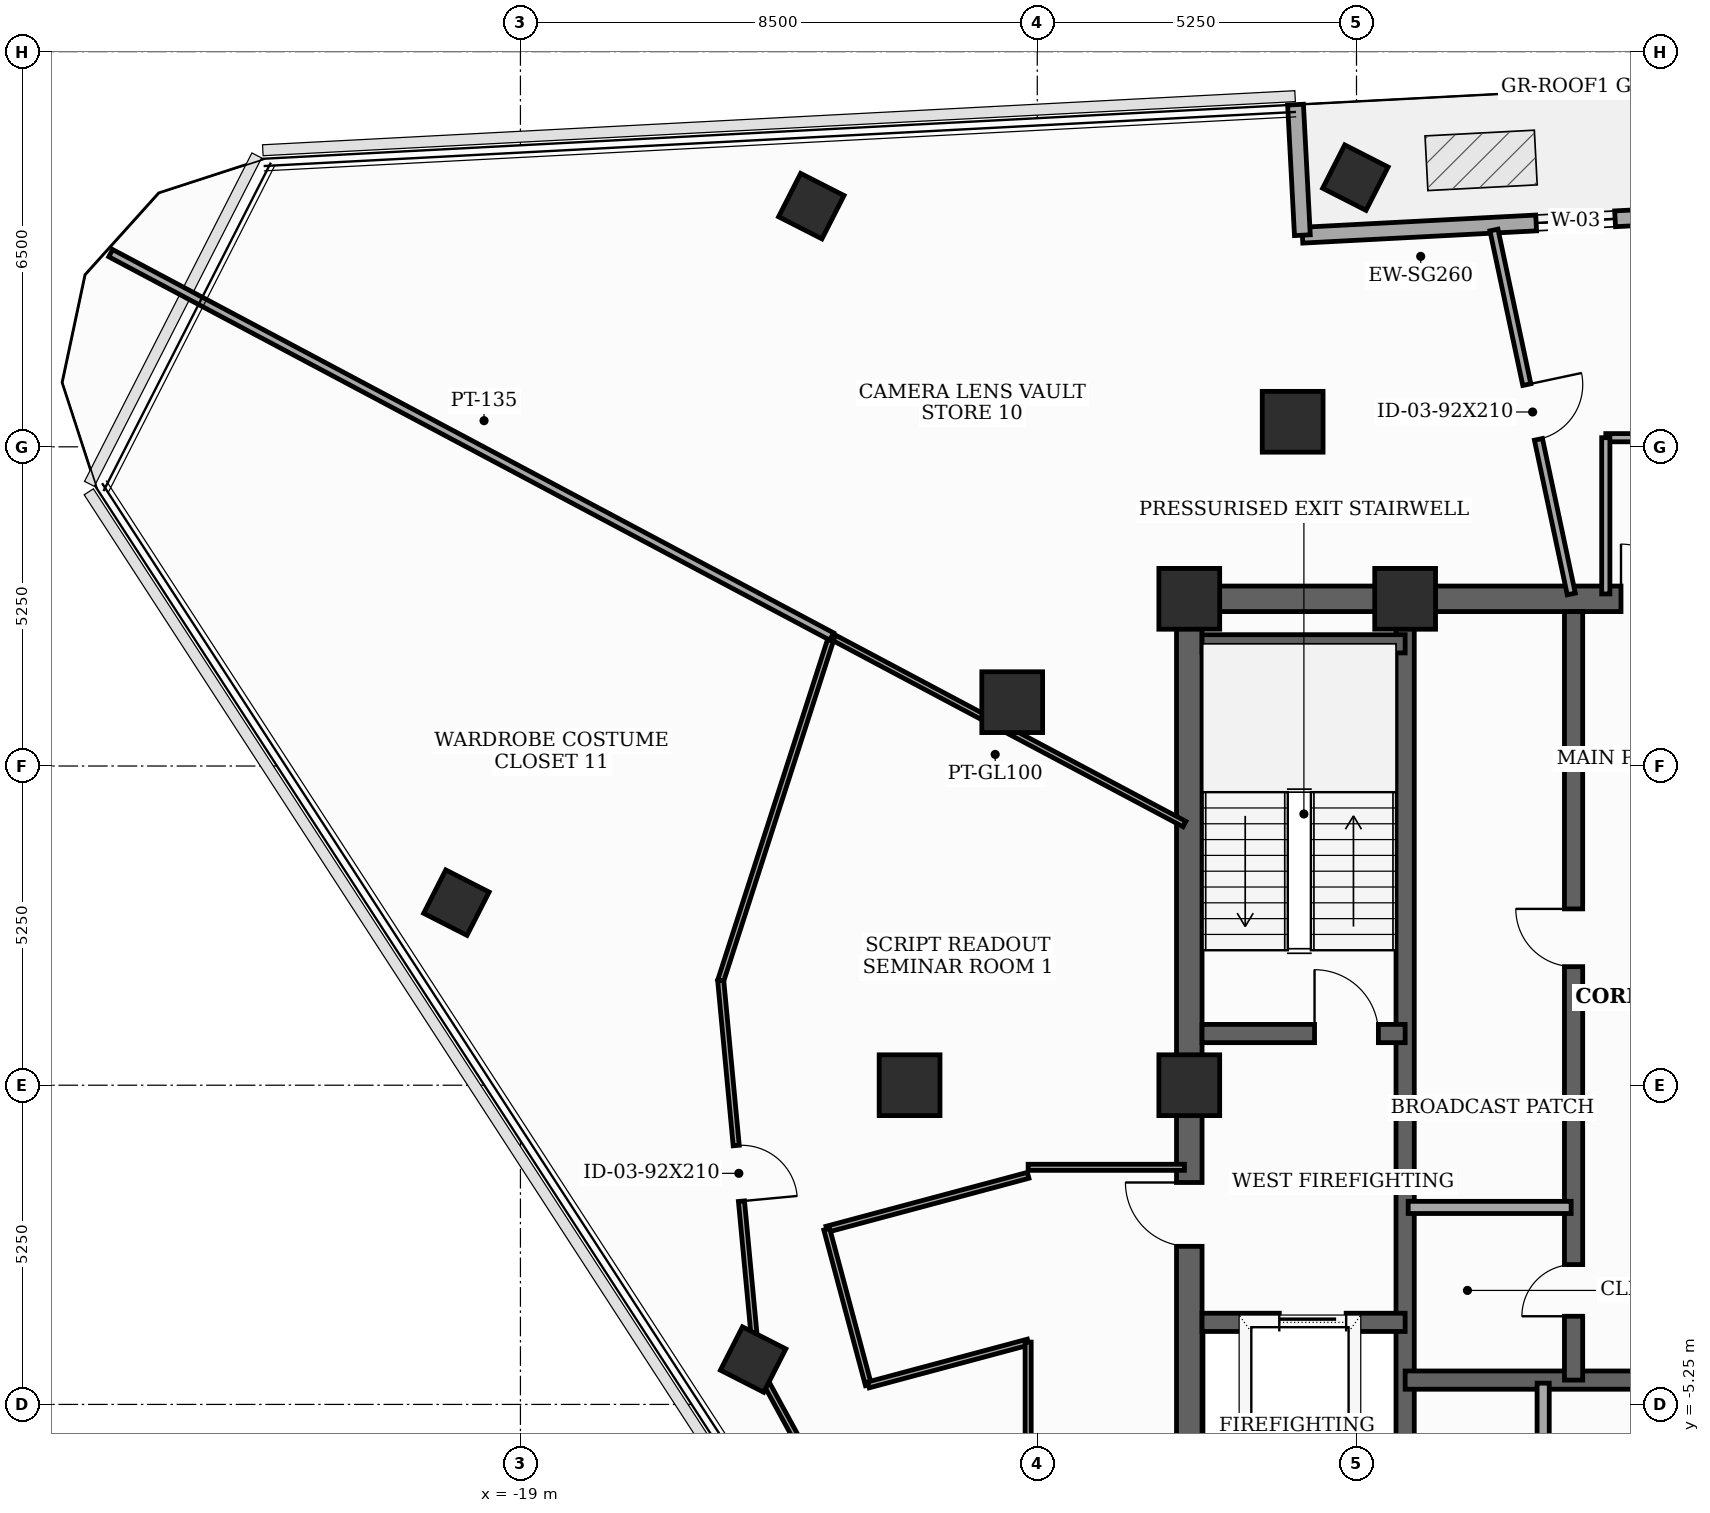
"""IFC4 building model, lengths in metres.
Left out: names, types, materials, properties, quantities, classifications, styles, units other than length and angle.
Written with IfcOpenShell. Run it as: python <this file> out.ifc"""

import sys

from ifc_helpers import new_model, si_unit, direction, frame, frame_2d, origin, origin_2d, place, context, subcontext, project, spatial, rectangle, extrude, element, fill, save


model = new_model("IFC4")
c1 = context("Model", 3, precision=1e-05, world=origin(), true_north=direction((0.0, 1.0)))
c2 = subcontext(c1, "Body", "Model", "MODEL_VIEW")
j1 = project(units=[si_unit("LENGTHUNIT", "METRE"), si_unit("PLANEANGLEUNIT", "RADIAN")], contexts=[c1])
p1 = place(None, origin())
s1 = spatial("IfcSite", under=j1, at=p1, CompositionType="ELEMENT")
p2 = place(p1, origin())
s2 = spatial("IfcBuilding", under=s1, at=p2, CompositionType="ELEMENT")
p3 = place(p2, frame((0.0, 0.0, 270.7)))
s3 = spatial("IfcBuildingStorey", under=s2, at=p3, CompositionType="ELEMENT", Elevation=270.7)
for number, where, z_axis, x_axis in (
    (1, (-4.45, 8.0, 0.0), (0.0, 0.0, 1.0), (1.0, 0.0, 0.0)),
    (2, (-8.0, 8.0, 0.0), (0.0, 0.0, 1.0), (1.0, 0.0, 0.0)),
    (3, (-8.0, 0.0, 0.0), (0.0, 0.0, 1.0), (1.0, 0.0, 0.0)),
    (4, (-6.3, 10.912, 0.0), (0.0, 0.0, 1.0), (1.0, 0.0, 0.0)),
    (5, (-10.912, 6.3, 0.0), (0.0, 0.0, 1.0), (1.0, 0.0, 0.0)),
    (6, (-12.6, 0.0, 0.0), (0.0, 0.0, 1.0), (1.0, 0.0, 0.0)),
):
    element("IfcColumn", number, at=place(p3, frame(where, z_axis=z_axis, x_axis=x_axis)), inside=s3, PredefinedType="COLUMN", context=c2, shape_type="SweptSolid", body=[
        extrude(rectangle(XDim=1.0, YDim=1.0, at=origin_2d()), origin(), (0.0, 0.0, 1.0), 3.7),
    ])
for number, where, z_axis, x_axis in (
    (7, (-5.269, 14.927, 0.0), (0.0, 0.0, 1.0), (0.454, 0.891, 0.0)),
    (8, (-14.216, 14.458, 0.0), (0.0, 0.0, 1.0), (0.454, 0.891, 0.0)),
    (9, (-20.053, 3.003, 0.0), (0.0, 0.0, 1.0), (0.454, 0.891, 0.0)),
    (10, (-15.173, -4.512, 0.0), (0.0, 0.0, 1.0), (0.454, 0.891, 0.0)),
):
    element("IfcColumn", number, at=place(p3, frame(where, z_axis=z_axis, x_axis=x_axis)), inside=s3, PredefinedType="COLUMN", context=c2, shape_type="SweptSolid", body=[
        extrude(rectangle(XDim=0.8, YDim=0.8, at=origin_2d()), origin(), (0.0, 0.0, 1.0), 3.7),
    ])
p4 = place(p3, frame((4.645, 14.546, 0.0), z_axis=(0.0, 0.0, 1.0), x_axis=(-0.99862973094, -0.052332212675, 0.0)))
e11 = element("IfcWall", 11, at=p4, inside=s3, PredefinedType="SOLIDWALL", context=c2, shape_type="SweptSolid", body=[
    extrude(rectangle(XDim=10.8, YDim=0.26, at=frame_2d((5.4, 0.0))), origin(), (0.0, 0.0, 1.0), 3.5),
])
p5 = place(p4, frame((1.75, 0.0, 0.0)))
e12 = element("IfcOpeningElement", 12, at=p5, cuts=e11, PredefinedType="OPENING", context=c2, shape_type="SweptSolid", body=[
    extrude(rectangle(XDim=1.6, YDim=2.08, at=frame_2d((0.8, 1.04))), frame((0.0, 0.14, 0.0), z_axis=(0.0, -1.0, 0.0), x_axis=(1.0, 0.0, 0.0)), (0.0, 0.0, 1.0), 0.28),
])
p6 = place(p4, frame((5.65, 0.0, 0.85)))
e13 = element("IfcOpeningElement", 13, at=p6, cuts=e11, PredefinedType="OPENING", context=c2, shape_type="SweptSolid", body=[
    extrude(rectangle(XDim=1.3, YDim=1.25, at=frame_2d((0.65, 0.625))), frame((0.0, 0.14, 0.0), z_axis=(0.0, -1.0, 0.0), x_axis=(1.0, 0.0, 0.0)), (0.0, 0.0, 1.0), 0.28),
])
p7 = place(p3, frame((-6.14, 13.98, 0.0), z_axis=(0.0, 0.0, 1.0), x_axis=(-0.052350224103, 0.998628786905, 0.0)))
e14 = element("IfcWall", 14, at=p7, inside=s3, PredefinedType="SOLIDWALL", context=c2, shape_type="SweptSolid", body=[
    extrude(rectangle(XDim=2.15, YDim=0.26, at=frame_2d((1.075, 0.0))), origin(), (0.0, 0.0, 1.0), 3.5),
])
p8 = place(p3, frame((-8.0, -8.0, 0.0), z_axis=(0.0, 0.0, 1.0), x_axis=(0.0, 1.0, 0.0)))
e15 = element("IfcWall", 15, at=p8, inside=s3, PredefinedType="SHEAR", context=c2, shape_type="SweptSolid", body=[
    extrude(rectangle(XDim=16.0, YDim=0.42, at=frame_2d((8.0, 0.0))), origin(), (0.0, 0.0, 1.0), 3.5),
])
p9 = place(p8, frame((0.681, 0.0, 0.0)))
e16 = element("IfcOpeningElement", 16, at=p9, cuts=e15, PredefinedType="OPENING", context=c2, shape_type="SweptSolid", body=[
    extrude(rectangle(XDim=0.85, YDim=2.02, at=frame_2d((0.425, 1.01))), frame((0.0, 0.22, 0.0), z_axis=(0.0, -1.0, 0.0), x_axis=(1.0, 0.0, 0.0)), (0.0, 0.0, 1.0), 0.44),
])
p10 = place(p8, frame((5.35, 0.0, 0.0)))
e17 = element("IfcOpeningElement", 17, at=p10, cuts=e15, PredefinedType="OPENING", context=c2, shape_type="SweptSolid", body=[
    extrude(rectangle(XDim=1.05, YDim=2.15, at=frame_2d((0.525, 1.075))), frame((0.0, 0.22, 0.0), z_axis=(0.0, -1.0, 0.0), x_axis=(1.0, 0.0, 0.0)), (0.0, 0.0, 1.0), 0.44),
])
p11 = place(p3, frame((-8.0, 8.0, 0.0), z_axis=(0.0, 0.0, 1.0), x_axis=(1.0, 0.0, 0.0)))
e18 = element("IfcWall", 18, at=p11, inside=s3, PredefinedType="SHEAR", context=c2, shape_type="SweptSolid", body=[
    extrude(rectangle(XDim=16.0, YDim=0.42, at=frame_2d((8.0, 0.0))), origin(), (0.0, 0.0, 1.0), 3.5),
])
p12 = place(p11, frame((7.1, 0.0, 0.0)))
e19 = element("IfcOpeningElement", 19, at=p12, cuts=e18, PredefinedType="OPENING", context=c2, shape_type="SweptSolid", body=[
    extrude(rectangle(XDim=1.8, YDim=2.15, at=frame_2d((0.9, 1.075))), frame((0.0, 0.22, 0.0), z_axis=(0.0, -1.0, 0.0), x_axis=(1.0, 0.0, 0.0)), (0.0, 0.0, 1.0), 0.44),
])
p13 = place(p3, frame((-4.45, -7.79, 0.0), z_axis=(0.0, 0.0, 1.0), x_axis=(0.0, 1.0, 0.0)))
e20 = element("IfcWall", 20, at=p13, inside=s3, PredefinedType="SHEAR", context=c2, shape_type="SweptSolid", body=[
    extrude(rectangle(XDim=15.58, YDim=0.3, at=frame_2d((7.79, 0.0))), origin(), (0.0, 0.0, 1.0), 3.5),
])
p14 = place(p3, frame((-7.79, 0.85, 0.0), z_axis=(0.0, 0.0, 1.0), x_axis=(1.0, 0.0, 0.0)))
e21 = element("IfcWall", 21, at=p14, inside=s3, PredefinedType="SHEAR", context=c2, shape_type="SweptSolid", body=[
    extrude(rectangle(XDim=3.34, YDim=0.3, at=frame_2d((1.67, 0.0))), origin(), (0.0, 0.0, 1.0), 3.5),
])
p15 = place(p14, frame((1.85, 0.0, 0.0)))
e22 = element("IfcOpeningElement", 22, at=p15, cuts=e21, PredefinedType="OPENING", context=c2, shape_type="SweptSolid", body=[
    extrude(rectangle(XDim=1.05, YDim=2.15, at=frame_2d((0.525, 1.075))), frame((0.0, 0.16, 0.0), z_axis=(0.0, -1.0, 0.0), x_axis=(1.0, 0.0, 0.0)), (0.0, 0.0, 1.0), 0.32),
])
p16 = place(p3, frame((-7.79, 7.26, 0.0), z_axis=(0.0, 0.0, 1.0), x_axis=(1.0, 0.0, 0.0)))
e23 = element("IfcWall", 23, at=p16, inside=s3, PredefinedType="SHEAR", context=c2, shape_type="SweptSolid", body=[
    extrude(rectangle(XDim=3.34, YDim=0.3, at=frame_2d((1.67, 0.0))), origin(), (0.0, 0.0, 1.0), 3.5),
])
p17 = place(p3, frame((-7.79, -3.9, 0.0), z_axis=(0.0, 0.0, 1.0), x_axis=(1.0, 0.0, 0.0)))
e24 = element("IfcWall", 24, at=p17, inside=s3, PredefinedType="SHEAR", context=c2, shape_type="SweptSolid", body=[
    extrude(rectangle(XDim=3.34, YDim=0.3, at=frame_2d((1.67, 0.0))), origin(), (0.0, 0.0, 1.0), 3.5),
])
p18 = place(p17, frame((1.27, 0.0, 0.0)))
e25 = element("IfcOpeningElement", 25, at=p18, cuts=e24, PredefinedType="OPENING", context=c2, shape_type="SweptSolid", body=[
    extrude(rectangle(XDim=1.1, YDim=2.1, at=frame_2d((0.55, 1.05))), frame((0.0, 0.16, 0.0), z_axis=(0.0, -1.0, 0.0), x_axis=(1.0, 0.0, 0.0)), (0.0, 0.0, 1.0), 0.32),
])
p19 = place(p3, frame((-4.45, -4.85, 0.0), z_axis=(0.0, 0.0, 1.0), x_axis=(1.0, 0.0, 0.0)))
e26 = element("IfcWall", 26, at=p19, inside=s3, PredefinedType="SHEAR", context=c2, shape_type="SweptSolid", body=[
    extrude(rectangle(XDim=8.9, YDim=0.3, at=frame_2d((4.45, 0.0))), origin(), (0.0, 0.0, 1.0), 3.5),
])
p20 = place(p3, frame((-1.68, -4.85, 0.0), z_axis=(0.0, 0.0, 1.0), x_axis=(0.0, 1.0, 0.0)))
e27 = element("IfcWall", 27, at=p20, inside=s3, PredefinedType="SHEAR", context=c2, shape_type="SweptSolid", body=[
    extrude(rectangle(XDim=12.64, YDim=0.3, at=frame_2d((6.32, 0.0))), origin(), (0.0, 0.0, 1.0), 3.5),
])
p21 = place(p20, frame((1.05, 0.0, 0.0)))
e28 = element("IfcOpeningElement", 28, at=p21, cuts=e27, PredefinedType="OPENING", context=c2, shape_type="SweptSolid", body=[
    extrude(rectangle(XDim=0.85, YDim=2.02, at=frame_2d((0.425, 1.01))), frame((0.0, 0.16, 0.0), z_axis=(0.0, -1.0, 0.0), x_axis=(1.0, 0.0, 0.0)), (0.0, 0.0, 1.0), 0.32),
])
p22 = place(p20, frame((6.8, 0.0, 0.0)))
e29 = element("IfcOpeningElement", 29, at=p22, cuts=e27, PredefinedType="OPENING", context=c2, shape_type="SweptSolid", body=[
    extrude(rectangle(XDim=0.95, YDim=2.1, at=frame_2d((0.475, 1.05))), frame((0.0, 0.16, 0.0), z_axis=(0.0, -1.0, 0.0), x_axis=(1.0, 0.0, 0.0)), (0.0, 0.0, 1.0), 0.32),
])
p23 = place(p3, frame((-2.18, -7.85, 0.0), z_axis=(0.0, 0.0, 1.0), x_axis=(0.0, 1.0, 0.0)))
e30 = element("IfcWall", 30, at=p23, inside=s3, PredefinedType="SOLIDWALL", context=c2, shape_type="SweptSolid", body=[
    extrude(rectangle(XDim=2.95, YDim=0.2, at=frame_2d((1.475, 0.0))), origin(), (0.0, 0.0, 1.0), 2.885),
])
p24 = place(p3, frame((-4.4, -2.01, 0.0), z_axis=(0.0, 0.0, 1.0), x_axis=(1.0, 0.0, 0.0)))
e31 = element("IfcWall", 31, at=p24, inside=s3, PredefinedType="SOLIDWALL", context=c2, shape_type="SweptSolid", body=[
    extrude(rectangle(XDim=2.68, YDim=0.2, at=frame_2d((1.34, 0.0))), origin(), (0.0, 0.0, 1.0), 3.5),
])
p25 = place(p3, frame((-8.08, -1.35, 0.0), z_axis=(0.0, 0.0, 1.0), x_axis=(-1.0, 0.0, 0.0)))
e32 = element("IfcWall", 32, at=p25, inside=s3, PredefinedType="MOVABLE", context=c2, shape_type="SweptSolid", body=[
    extrude(rectangle(XDim=2.57, YDim=0.1, at=frame_2d((1.285, 0.0))), origin(), (0.0, 0.0, 1.0), 2.885),
])
p26 = place(p3, frame((-10.65, -1.482, 0.0), z_axis=(0.0, 0.0, 1.0), x_axis=(-0.965961397105, -0.2586862565, 0.0)))
e33 = element("IfcWall", 33, at=p26, inside=s3, PredefinedType="MOVABLE", context=c2, shape_type="SweptSolid", body=[
    extrude(rectangle(XDim=3.429, YDim=0.1, at=frame_2d((1.714, 0.0))), origin(), (0.0, 0.0, 1.0), 2.885),
])
p27 = place(p3, frame((-13.962, -2.369, 0.0), z_axis=(0.0, 0.0, 1.0), x_axis=(0.258413725385, -0.966034340245, 0.0)))
e34 = element("IfcWall", 34, at=p27, inside=s3, PredefinedType="MOVABLE", context=c2, shape_type="SweptSolid", body=[
    extrude(rectangle(XDim=2.65, YDim=0.1, at=frame_2d((1.325, 0.0))), origin(), (0.0, 0.0, 1.0), 3.5),
])
p28 = place(p3, frame((-13.277, -4.929, 0.0), z_axis=(0.0, 0.0, 1.0), x_axis=(0.965934830229, 0.258785439601, 0.0)))
e35 = element("IfcWall", 35, at=p28, inside=s3, PredefinedType="MOVABLE", context=c2, shape_type="SweptSolid", body=[
    extrude(rectangle(XDim=2.72, YDim=0.1, at=frame_2d((1.36, 0.0))), origin(), (0.0, 0.0, 1.0), 2.885),
])
p29 = place(p3, frame((-10.65, -4.225, 0.0), z_axis=(0.0, 0.0, 1.0), x_axis=(0.0, -1.0, 0.0)))
e36 = element("IfcWall", 36, at=p29, inside=s3, PredefinedType="MOVABLE", context=c2, shape_type="SweptSolid", body=[
    extrude(rectangle(XDim=5.925, YDim=0.1, at=frame_2d((2.962, 0.0))), origin(), (0.0, 0.0, 1.0), 2.885),
])
p30 = place(p29, frame((4.28, 0.0, 0.0)))
e37 = element("IfcOpeningElement", 37, at=p30, cuts=e36, PredefinedType="OPENING", context=c2, shape_type="SweptSolid", body=[
    extrude(rectangle(XDim=0.92, YDim=2.1, at=frame_2d((0.46, 1.05))), frame((0.0, 0.06, 0.0), z_axis=(0.0, -1.0, 0.0), x_axis=(1.0, 0.0, 0.0)), (0.0, 0.0, 1.0), 0.12),
])
p31 = place(p3, frame((10.15, 10.65, 0.0), z_axis=(0.0, 0.0, 1.0), x_axis=(-1.0, 0.0, 0.0)))
e38 = element("IfcWall", 38, at=p31, inside=s3, PredefinedType="PARTITIONING", context=c2, shape_type="SweptSolid", body=[
    extrude(rectangle(XDim=11.3, YDim=0.135, at=frame_2d((5.65, 0.0))), origin(), (0.0, 0.0, 1.0), 2.885),
])
p32 = place(p31, frame((6.531, 0.0, 0.0)))
e39 = element("IfcOpeningElement", 39, at=p32, cuts=e38, PredefinedType="OPENING", context=c2, shape_type="SweptSolid", body=[
    extrude(rectangle(XDim=0.95, YDim=2.1, at=frame_2d((0.475, 1.05))), frame((0.0, 0.077, 0.0), z_axis=(0.0, -1.0, 0.0), x_axis=(1.0, 0.0, 0.0)), (0.0, 0.0, 1.0), 0.155),
])
p33 = place(p3, frame((-1.15, 10.65, 0.0), z_axis=(0.0, 0.0, 1.0), x_axis=(0.0, -1.0, 0.0)))
e40 = element("IfcWall", 40, at=p33, inside=s3, PredefinedType="PARTITIONING", context=c2, shape_type="SweptSolid", body=[
    extrude(rectangle(XDim=2.57, YDim=0.135, at=frame_2d((1.285, 0.0))), origin(), (0.0, 0.0, 1.0), 2.885),
])
p34 = place(p3, frame((-8.08, 4.296, 0.0), z_axis=(0.0, 0.0, 1.0), x_axis=(-0.882977594756, 0.469415133074, 0.0)))
e41 = element("IfcWall", 41, at=p34, inside=s3, PredefinedType="MOVABLE", context=c2, shape_type="SweptSolid", body=[
    extrude(rectangle(XDim=6.57, YDim=0.1, at=frame_2d((3.285, 0.0))), origin(), (0.0, 0.0, 1.0), 2.885),
])
p35 = place(p3, frame((-13.881, 7.38, 0.0), z_axis=(0.0, 0.0, 1.0), x_axis=(-0.306876830036, -0.951749237555, 0.0)))
e42 = element("IfcWall", 42, at=p35, inside=s3, PredefinedType="MOVABLE", context=c2, shape_type="SweptSolid", body=[
    extrude(rectangle(XDim=5.947, YDim=0.1, at=frame_2d((2.973, 0.0))), origin(), (0.0, 0.0, 1.0), 3.185),
])
p36 = place(p3, frame((-15.706, 1.72, 0.0), z_axis=(0.0, 0.0, 1.0), x_axis=(0.093602035829, -0.995609692042, 0.0)))
e43 = element("IfcWall", 43, at=p36, inside=s3, PredefinedType="MOVABLE", context=c2, shape_type="SweptSolid", body=[
    extrude(rectangle(XDim=6.367, YDim=0.1, at=frame_2d((3.183, 0.0))), origin(), (0.0, 0.0, 1.0), 3.035),
])
p37 = place(p36, frame((2.723, 0.0, 0.0)))
e44 = element("IfcOpeningElement", 44, at=p37, cuts=e43, PredefinedType="OPENING", context=c2, shape_type="SweptSolid", body=[
    extrude(rectangle(XDim=0.92, YDim=2.1, at=frame_2d((0.46, 1.05))), frame((0.0, 0.06, 0.0), z_axis=(0.0, -1.0, 0.0), x_axis=(1.0, 0.0, 0.0)), (0.0, 0.0, 1.0), 0.12),
])
p38 = place(p3, frame((-15.11, -4.619, 0.0), z_axis=(0.0, 0.0, 1.0), x_axis=(0.47908041906, -0.877771013461, 0.0)))
e45 = element("IfcWall", 45, at=p38, inside=s3, PredefinedType="MOVABLE", context=c2, shape_type="SweptSolid", body=[
    extrude(rectangle(XDim=6.368, YDim=0.1, at=frame_2d((3.184, 0.0))), origin(), (0.0, 0.0, 1.0), 3.035),
])
p39 = place(p3, frame((-2.99, 14.065, 0.0), z_axis=(0.0, 0.0, 1.0), x_axis=(0.207910291146, -0.978147898242, 0.0)))
e46 = element("IfcWall", 46, at=p39, inside=s3, PredefinedType="PARTITIONING", context=c2, shape_type="SweptSolid", body=[
    extrude(rectangle(XDim=6.119, YDim=0.135, at=frame_2d((3.06, 0.0))), origin(), (0.0, 0.0, 1.0), 2.885),
])
p40 = place(p39, frame((2.6, 0.0, 0.0)))
e47 = element("IfcOpeningElement", 47, at=p40, cuts=e46, PredefinedType="OPENING", context=c2, shape_type="SweptSolid", body=[
    extrude(rectangle(XDim=0.92, YDim=2.1, at=frame_2d((0.46, 1.05))), frame((0.0, 0.077, 0.0), z_axis=(0.0, -1.0, 0.0), x_axis=(1.0, 0.0, 0.0)), (0.0, 0.0, 1.0), 0.155),
])
p41 = place(p3, frame((-25.738, 13.685, 0.0), z_axis=(0.0, 0.0, 1.0), x_axis=(0.882921457353, -0.469520713222, 0.0)))
e48 = element("IfcWall", 48, at=p41, inside=s3, PredefinedType="PARTITIONING", context=c2, shape_type="SweptSolid", body=[
    extrude(rectangle(XDim=13.429, YDim=0.135, at=frame_2d((6.715, 0.0))), origin(), (0.0, 0.0, 1.0), 3.035),
])
p42 = place(p6, origin())
e49 = element("IfcWindow", 49, at=p42, inside=s3, PartitioningType="SINGLE_PANEL", PredefinedType="WINDOW", context=c2, shape_type="SweptSolid", body=[
    extrude(rectangle(XDim=1.3, YDim=1.25, at=frame_2d((0.65, 0.625))), frame((0.0, 0.03, 0.0), z_axis=(0.0, -1.0, 0.0), x_axis=(1.0, 0.0, 0.0)), (0.0, 0.0, 1.0), 0.06),
])
fill(e13, e49)
p43 = place(p10, origin())
e50 = element("IfcDoor", 50, at=p43, inside=s3, OperationType="SINGLE_SWING_RIGHT", PredefinedType="DOOR", context=c2, shape_type="SweptSolid", body=[
    extrude(rectangle(XDim=1.05, YDim=2.15, at=frame_2d((0.525, 1.075))), frame((0.0, 0.025, 0.0), z_axis=(0.0, -1.0, 0.0), x_axis=(1.0, 0.0, 0.0)), (0.0, 0.0, 1.0), 0.05),
])
fill(e17, e50)
p44 = place(p12, origin())
e51 = element("IfcDoor", 51, at=p44, inside=s3, OperationType="DOUBLE_DOOR_SINGLE_SWING", PredefinedType="DOOR", context=c2, shape_type="SweptSolid", body=[
    extrude(rectangle(XDim=1.8, YDim=2.15, at=frame_2d((0.9, 1.075))), frame((0.0, 0.025, 0.0), z_axis=(0.0, -1.0, 0.0), x_axis=(1.0, 0.0, 0.0)), (0.0, 0.0, 1.0), 0.05),
])
fill(e19, e51)
p45 = place(p15, origin())
e52 = element("IfcDoor", 52, at=p45, inside=s3, OperationType="SINGLE_SWING_LEFT", PredefinedType="DOOR", context=c2, shape_type="SweptSolid", body=[
    extrude(rectangle(XDim=1.05, YDim=2.15, at=frame_2d((0.525, 1.075))), frame((0.0, 0.025, 0.0), z_axis=(0.0, -1.0, 0.0), x_axis=(1.0, 0.0, 0.0)), (0.0, 0.0, 1.0), 0.05),
])
fill(e22, e52)
p46 = place(p18, origin())
e53 = element("IfcDoor", 53, at=p46, inside=s3, OperationType="SLIDING_TO_LEFT", PredefinedType="DOOR", context=c2, shape_type="SweptSolid", body=[
    extrude(rectangle(XDim=1.1, YDim=2.1, at=frame_2d((0.55, 1.05))), frame((0.0, 0.025, 0.0), z_axis=(0.0, -1.0, 0.0), x_axis=(1.0, 0.0, 0.0)), (0.0, 0.0, 1.0), 0.05),
])
fill(e25, e53)
p47 = place(p21, origin())
e54 = element("IfcDoor", 54, at=p47, inside=s3, OperationType="SINGLE_SWING_LEFT", PredefinedType="TRAPDOOR", context=c2, shape_type="SweptSolid", body=[
    extrude(rectangle(XDim=0.85, YDim=2.02, at=frame_2d((0.425, 1.01))), frame((0.0, 0.025, 0.0), z_axis=(0.0, -1.0, 0.0), x_axis=(1.0, 0.0, 0.0)), (0.0, 0.0, 1.0), 0.05),
])
fill(e28, e54)
p48 = place(p22, origin())
e55 = element("IfcDoor", 55, at=p48, inside=s3, OperationType="SINGLE_SWING_RIGHT", PredefinedType="DOOR", context=c2, shape_type="SweptSolid", body=[
    extrude(rectangle(XDim=0.95, YDim=2.1, at=frame_2d((0.475, 1.05))), frame((0.0, 0.025, 0.0), z_axis=(0.0, -1.0, 0.0), x_axis=(1.0, 0.0, 0.0)), (0.0, 0.0, 1.0), 0.05),
])
fill(e29, e55)
p49 = place(p37, origin())
e56 = element("IfcDoor", 56, at=p49, inside=s3, OperationType="SINGLE_SWING_RIGHT", PredefinedType="DOOR", context=c2, shape_type="SweptSolid", body=[
    extrude(rectangle(XDim=0.92, YDim=2.1, at=frame_2d((0.46, 1.05))), frame((0.0, 0.025, 0.0), z_axis=(0.0, -1.0, 0.0), x_axis=(1.0, 0.0, 0.0)), (0.0, 0.0, 1.0), 0.05),
])
fill(e44, e56)
p50 = place(p40, origin())
e57 = element("IfcDoor", 57, at=p50, inside=s3, OperationType="SINGLE_SWING_LEFT", PredefinedType="DOOR", context=c2, shape_type="SweptSolid", body=[
    extrude(rectangle(XDim=0.92, YDim=2.1, at=frame_2d((0.46, 1.05))), frame((0.0, 0.025, 0.0), z_axis=(0.0, -1.0, 0.0), x_axis=(1.0, 0.0, 0.0)), (0.0, 0.0, 1.0), 0.05),
])
fill(e47, e57)
save(model, sys.argv[1])
